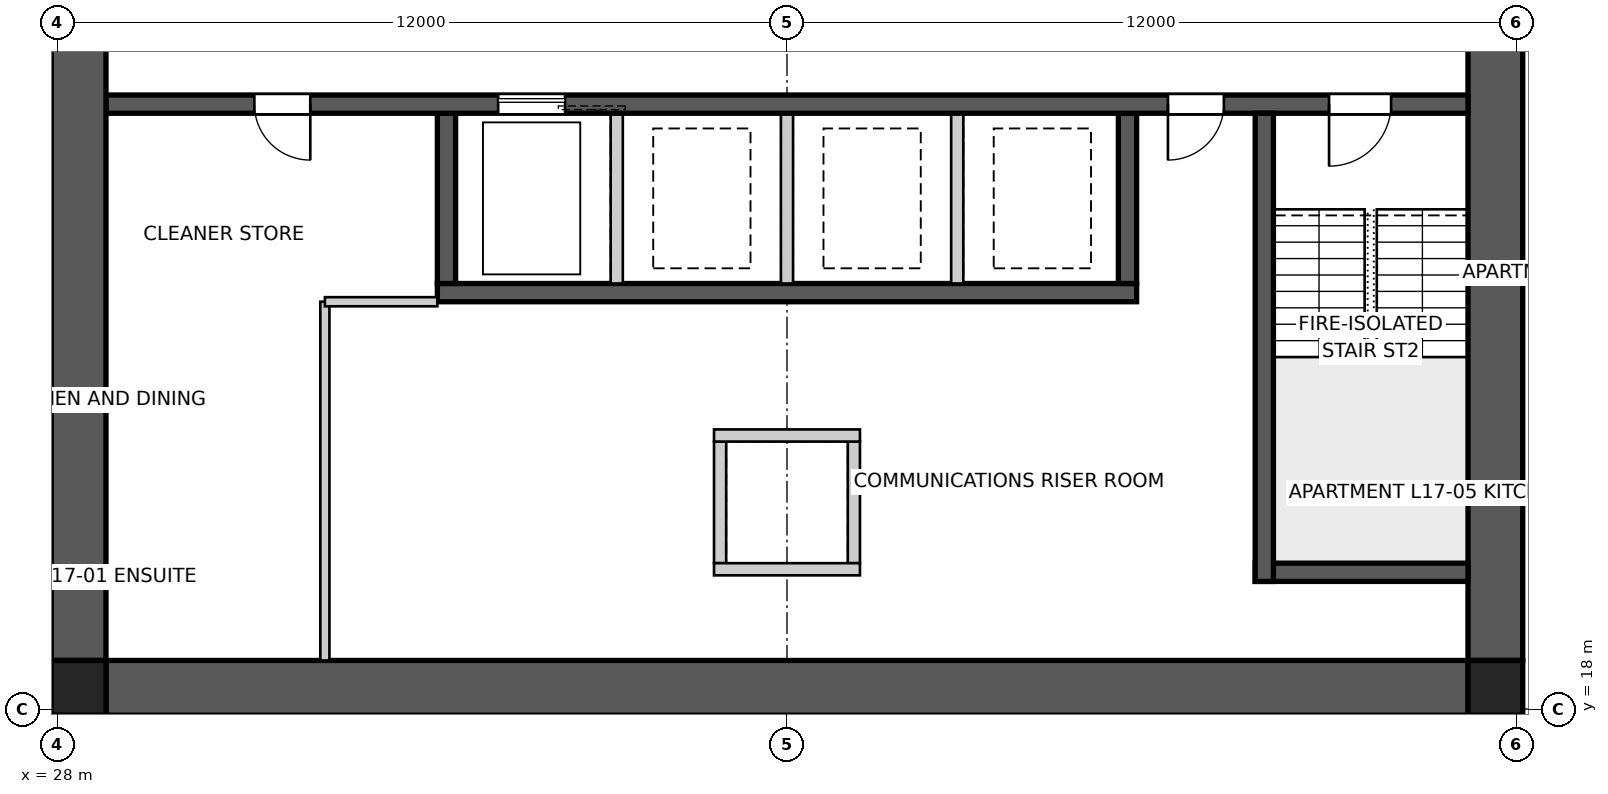
"""IFC4 building model, lengths in metres.
Left out: names, types, materials, properties, quantities, classifications, styles, units other than length and angle.
Written with IfcOpenShell. Run it as: python <this file> out.ifc"""

import sys

from ifc_helpers import new_model, si_unit, direction, frame, frame_2d, origin, origin_2d, place, context, subcontext, project, spatial, polyline, rectangle, outline, extrude, element, fill, save


model = new_model("IFC4")
c1 = context("Model", 3, precision=1e-05, world=origin(), true_north=direction((0.0, 1.0)))
c2 = subcontext(c1, "Body", "Model", "MODEL_VIEW")
j1 = project(units=[si_unit("LENGTHUNIT", "METRE"), si_unit("PLANEANGLEUNIT", "RADIAN")], contexts=[c1])
p1 = place(None, origin())
s1 = spatial("IfcSite", under=j1, at=p1, CompositionType="ELEMENT")
p2 = place(p1, origin())
s2 = spatial("IfcBuilding", under=s1, at=p2, CompositionType="ELEMENT")
p3 = place(p2, frame((0.0, 0.0, 64.2)))
s3 = spatial("IfcBuildingStorey", under=s2, at=p3, CompositionType="ELEMENT", Elevation=64.2)
p4 = place(p3, frame((51.2, 18.35, 0.0), z_axis=(0.0, 0.0, 1.0), x_axis=(-1.0, 0.0, 0.0)))
e1 = element("IfcWall", 1, at=p4, inside=s3, PredefinedType="SHEAR", context=c2, shape_type="SweptSolid", body=[
    extrude(outline(polyline([(0.0, -0.45), (22.4, -0.45), (22.4, -0.025), (22.85, -0.025), (22.85, 0.025), (22.4, 0.025), (22.4, 0.45), (0.0, 0.45), (0.0, 0.025), (-0.45, 0.025), (-0.45, -0.025), (0.0, -0.025), (0.0, -0.45)])), origin(), (0.0, 0.0, 1.0), 3.4),
])
p5 = place(p3, frame((51.65, 18.8, 0.0), z_axis=(0.0, 0.0, 1.0), x_axis=(0.0, 1.0, 0.0)))
e2 = element("IfcWall", 2, at=p5, inside=s3, PredefinedType="SHEAR", context=c2, shape_type="SweptSolid", body=[
    extrude(outline(polyline([(0.0, -0.45), (22.4, -0.45), (22.4, -0.025), (22.85, -0.025), (22.85, 0.025), (22.4, 0.025), (22.4, 0.45), (0.0, 0.45), (0.0, 0.025), (-0.45, 0.025), (-0.45, -0.025), (0.0, -0.025), (0.0, -0.45)])), origin(), (0.0, 0.0, 1.0), 3.4),
])
p6 = place(p5, frame((11.14, 0.0, 0.0)))
e3 = element("IfcOpeningElement", 3, at=p6, cuts=e2, PredefinedType="OPENING", context=c2, shape_type="SweptSolid", body=[
    extrude(rectangle(XDim=1.02, YDim=2.4, at=frame_2d((0.51, 1.2))), frame((0.0, 0.46, 0.0), z_axis=(0.0, -1.0, 0.0), x_axis=(1.0, 0.0, 0.0)), (0.0, 0.0, 1.0), 0.92),
])
p7 = place(p3, frame((28.35, 41.2, 0.0), z_axis=(0.0, 0.0, 1.0), x_axis=(0.0, -1.0, 0.0)))
e4 = element("IfcWall", 4, at=p7, inside=s3, PredefinedType="SHEAR", context=c2, shape_type="SweptSolid", body=[
    extrude(outline(polyline([(0.0, -0.45), (22.4, -0.45), (22.4, -0.025), (22.85, -0.025), (22.85, 0.025), (22.4, 0.025), (22.4, 0.45), (0.0, 0.45), (0.0, 0.025), (-0.45, 0.025), (-0.45, -0.025), (0.0, -0.025), (0.0, -0.45)])), origin(), (0.0, 0.0, 1.0), 3.4),
])
p8 = place(p7, frame((11.14, 0.0, 0.0)))
e5 = element("IfcOpeningElement", 5, at=p8, cuts=e4, PredefinedType="OPENING", context=c2, shape_type="SweptSolid", body=[
    extrude(rectangle(XDim=1.02, YDim=2.4, at=frame_2d((0.51, 1.2))), frame((0.0, 0.46, 0.0), z_axis=(0.0, -1.0, 0.0), x_axis=(1.0, 0.0, 0.0)), (0.0, 0.0, 1.0), 0.92),
])
p9 = place(p3, frame((51.2, 27.95, 0.0), z_axis=(0.0, 0.0, 1.0), x_axis=(-1.0, 0.0, 0.0)))
e6 = element("IfcWall", 6, at=p9, inside=s3, PredefinedType="SHEAR", context=c2, shape_type="SweptSolid", body=[
    extrude(rectangle(XDim=22.4, YDim=0.3, at=frame_2d((11.2, 0.0))), origin(), (0.0, 0.0, 1.0), 3.4),
])
p10 = place(p9, frame((19.04, 0.0, 0.0)))
e7 = element("IfcOpeningElement", 7, at=p10, cuts=e6, PredefinedType="OPENING", context=c2, shape_type="SweptSolid", body=[
    extrude(rectangle(XDim=0.92, YDim=2.1, at=frame_2d((0.46, 1.05))), frame((0.0, 0.16, 0.0), z_axis=(0.0, -1.0, 0.0), x_axis=(1.0, 0.0, 0.0)), (0.0, 0.0, 1.0), 0.32),
])
p11 = place(p9, frame((1.265, 0.0, 0.0)))
e8 = element("IfcOpeningElement", 8, at=p11, cuts=e6, PredefinedType="OPENING", context=c2, shape_type="SweptSolid", body=[
    extrude(rectangle(XDim=1.02, YDim=2.1, at=frame_2d((0.51, 1.05))), frame((0.0, 0.16, 0.0), z_axis=(0.0, -1.0, 0.0), x_axis=(1.0, 0.0, 0.0)), (0.0, 0.0, 1.0), 0.32),
])
p12 = place(p9, frame((4.015, 0.0, 0.0)))
e9 = element("IfcOpeningElement", 9, at=p12, cuts=e6, PredefinedType="OPENING", context=c2, shape_type="SweptSolid", body=[
    extrude(rectangle(XDim=0.92, YDim=2.1, at=frame_2d((0.46, 1.05))), frame((0.0, 0.16, 0.0), z_axis=(0.0, -1.0, 0.0), x_axis=(1.0, 0.0, 0.0)), (0.0, 0.0, 1.0), 0.32),
])
p13 = place(p9, frame((14.85, 0.0, 0.0)))
e10 = element("IfcOpeningElement", 10, at=p13, cuts=e6, PredefinedType="OPENING", context=c2, shape_type="SweptSolid", body=[
    extrude(rectangle(XDim=1.1, YDim=2.1, at=frame_2d((0.55, 1.05))), frame((0.0, 0.16, 0.0), z_axis=(0.0, -1.0, 0.0), x_axis=(1.0, 0.0, 0.0)), (0.0, 0.0, 1.0), 0.32),
])
p14 = place(p3, frame((45.75, 24.85, 0.0), z_axis=(0.0, 0.0, 1.0), x_axis=(-1.0, 0.0, 0.0)))
e11 = element("IfcWall", 11, at=p14, inside=s3, PredefinedType="SHEAR", context=c2, shape_type="SweptSolid", body=[
    extrude(rectangle(XDim=11.5, YDim=0.3, at=frame_2d((5.75, 0.0))), origin(), (0.0, 0.0, 1.0), 3.4),
])
p15 = place(p3, frame((45.6, 27.8, 0.0), z_axis=(0.0, 0.0, 1.0), x_axis=(0.0, -1.0, 0.0)))
e12 = element("IfcWall", 12, at=p15, inside=s3, PredefinedType="SHEAR", context=c2, shape_type="SweptSolid", body=[
    extrude(rectangle(XDim=2.8, YDim=0.3, at=frame_2d((1.4, 0.0))), origin(), (0.0, 0.0, 1.0), 3.4),
])
for number, where, z_axis, x_axis in (
    (13, (42.8, 27.8, 0.0), (0.0, 0.0, 1.0), (0.0, -1.0, 0.0)),
    (14, (40.0, 27.8, 0.0), (0.0, 0.0, 1.0), (0.0, -1.0, 0.0)),
    (15, (37.2, 27.8, 0.0), (0.0, 0.0, 1.0), (0.0, -1.0, 0.0)),
):
    element("IfcWall", number, at=place(p3, frame(where, z_axis=z_axis, x_axis=x_axis)), inside=s3, PredefinedType="SOLIDWALL", context=c2, shape_type="SweptSolid", body=[
        extrude(rectangle(XDim=2.8, YDim=0.2, at=frame_2d((1.4, 0.0))), origin(), (0.0, 0.0, 1.0), 3.4),
    ])
p16 = place(p3, frame((34.4, 27.8, 0.0), z_axis=(0.0, 0.0, 1.0), x_axis=(0.0, -1.0, 0.0)))
e16 = element("IfcWall", 16, at=p16, inside=s3, PredefinedType="SHEAR", context=c2, shape_type="SweptSolid", body=[
    extrude(rectangle(XDim=2.8, YDim=0.3, at=frame_2d((1.4, 0.0))), origin(), (0.0, 0.0, 1.0), 3.4),
])
p17 = place(p3, frame((47.85, 27.8, 0.0), z_axis=(0.0, 0.0, 1.0), x_axis=(0.0, -1.0, 0.0)))
e17 = element("IfcWall", 17, at=p17, inside=s3, PredefinedType="SHEAR", context=c2, shape_type="SweptSolid", body=[
    extrude(rectangle(XDim=7.7, YDim=0.3, at=frame_2d((3.85, 0.0))), origin(), (0.0, 0.0, 1.0), 3.4),
])
p18 = place(p3, frame((51.2, 20.25, 0.0), z_axis=(0.0, 0.0, 1.0), x_axis=(-1.0, 0.0, 0.0)))
e18 = element("IfcWall", 18, at=p18, inside=s3, PredefinedType="SHEAR", context=c2, shape_type="SweptSolid", body=[
    extrude(rectangle(XDim=3.5, YDim=0.3, at=frame_2d((1.75, 0.0))), origin(), (0.0, 0.0, 1.0), 3.4),
])
for number, where, z_axis, x_axis in (
    (19, (38.9, 22.4, 0.0), (0.0, 0.0, 1.0), (0.0, -1.0, 0.0)),
    (20, (41.1, 22.4, 0.0), (0.0, 0.0, 1.0), (0.0, -1.0, 0.0)),
):
    element("IfcWall", number, at=place(p3, frame(where, z_axis=z_axis, x_axis=x_axis)), inside=s3, PredefinedType="SOLIDWALL", context=c2, shape_type="SweptSolid", body=[
        extrude(rectangle(XDim=2.0, YDim=0.2, at=frame_2d((1.0, 0.0))), origin(), (0.0, 0.0, 1.0), 3.4),
    ])
for number, where, z_axis, x_axis in (
    (21, (38.8, 22.5, 0.0), (0.0, 0.0, 1.0), (1.0, 0.0, 0.0)),
    (22, (38.8, 20.3, 0.0), (0.0, 0.0, 1.0), (1.0, 0.0, 0.0)),
):
    element("IfcWall", number, at=place(p3, frame(where, z_axis=z_axis, x_axis=x_axis)), inside=s3, PredefinedType="SOLIDWALL", context=c2, shape_type="SweptSolid", body=[
        extrude(rectangle(XDim=2.4, YDim=0.2, at=frame_2d((1.2, 0.0))), origin(), (0.0, 0.0, 1.0), 3.4),
    ])
for number, where, z_axis, x_axis in (
    (23, (28.35, 18.35, 0.0), (0.0, 0.0, 1.0), (1.0, 0.0, 0.0)),
    (24, (51.65, 18.35, 0.0), (0.0, 0.0, 1.0), (1.0, 0.0, 0.0)),
):
    element("IfcColumn", number, at=place(p3, frame(where, z_axis=z_axis, x_axis=x_axis)), inside=s3, PredefinedType="COLUMN", context=c2, shape_type="SweptSolid", body=[
        extrude(rectangle(XDim=0.9, YDim=0.9, at=origin_2d()), origin(), (0.0, 0.0, 1.0), 3.4),
    ])
p19 = place(p3, frame((32.4, 18.8, 0.0), z_axis=(0.0, 0.0, 1.0), x_axis=(0.0, 1.0, 0.0)))
e25 = element("IfcWall", 25, at=p19, inside=s3, PredefinedType="SOLIDWALL", context=c2, shape_type="SweptSolid", body=[
    extrude(rectangle(XDim=5.9, YDim=0.15, at=frame_2d((2.95, 0.0))), origin(), (0.0, 0.0, 1.0), 3.25),
])
p20 = place(p3, frame((32.4, 24.7, 0.0), z_axis=(0.0, 0.0, 1.0), x_axis=(1.0, 0.0, 0.0)))
e26 = element("IfcWall", 26, at=p20, inside=s3, PredefinedType="SOLIDWALL", context=c2, shape_type="SweptSolid", body=[
    extrude(rectangle(XDim=1.85, YDim=0.15, at=frame_2d((0.925, 0.0))), origin(), (0.0, 0.0, 1.0), 3.25),
])
p21 = place(p10, origin())
e27 = element("IfcDoor", 27, at=p21, inside=s3, OperationType="SINGLE_SWING_LEFT", PredefinedType="DOOR", context=c2, shape_type="SweptSolid", body=[
    extrude(rectangle(XDim=0.92, YDim=2.1, at=frame_2d((0.46, 1.05))), frame((0.0, 0.025, 0.0), z_axis=(0.0, -1.0, 0.0), x_axis=(1.0, 0.0, 0.0)), (0.0, 0.0, 1.0), 0.05),
])
fill(e7, e27)
p22 = place(p11, origin())
e28 = element("IfcDoor", 28, at=p22, inside=s3, OperationType="SINGLE_SWING_RIGHT", PredefinedType="DOOR", context=c2, shape_type="SweptSolid", body=[
    extrude(rectangle(XDim=1.02, YDim=2.1, at=frame_2d((0.51, 1.05))), frame((0.0, 0.025, 0.0), z_axis=(0.0, -1.0, 0.0), x_axis=(1.0, 0.0, 0.0)), (0.0, 0.0, 1.0), 0.05),
])
fill(e8, e28)
p23 = place(p12, origin())
e29 = element("IfcDoor", 29, at=p23, inside=s3, OperationType="SINGLE_SWING_RIGHT", PredefinedType="DOOR", context=c2, shape_type="SweptSolid", body=[
    extrude(rectangle(XDim=0.92, YDim=2.1, at=frame_2d((0.46, 1.05))), frame((0.0, 0.025, 0.0), z_axis=(0.0, -1.0, 0.0), x_axis=(1.0, 0.0, 0.0)), (0.0, 0.0, 1.0), 0.05),
])
fill(e9, e29)
p24 = place(p13, origin())
e30 = element("IfcDoor", 30, at=p24, inside=s3, OperationType="SLIDING_TO_LEFT", PredefinedType="DOOR", context=c2, shape_type="SweptSolid", body=[
    extrude(rectangle(XDim=1.1, YDim=2.1, at=frame_2d((0.55, 1.05))), frame((0.0, 0.025, 0.0), z_axis=(0.0, -1.0, 0.0), x_axis=(1.0, 0.0, 0.0)), (0.0, 0.0, 1.0), 0.05),
])
fill(e10, e30)
save(model, sys.argv[1])
